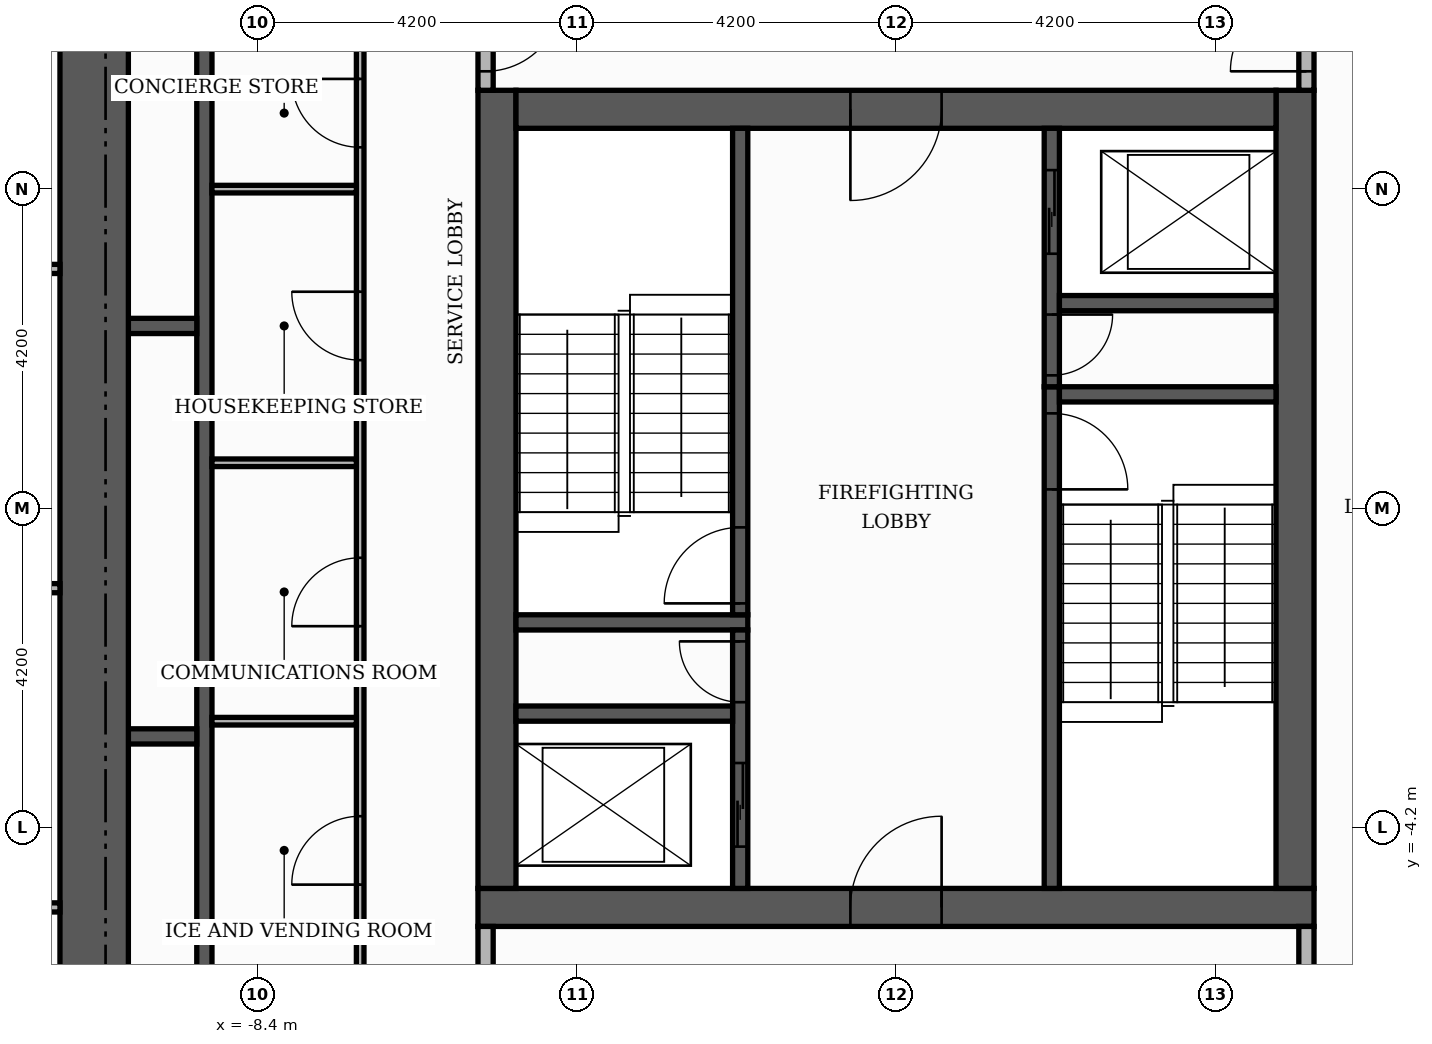
"""IFC4 building model, lengths in metres.
Left out: names, types, materials, properties, quantities, classifications, styles, units other than length and angle.
Written with IfcOpenShell. Run it as: python <this file> out.ifc"""

import sys

from ifc_helpers import new_model, si_unit, direction, frame, frame_2d, origin, place, context, subcontext, project, spatial, rectangle, extrude, element, fill, save


model = new_model("IFC4")
c1 = context("Model", 3, precision=1e-05, world=origin(), true_north=direction((0.0, 1.0)))
c2 = subcontext(c1, "Body", "Model", "MODEL_VIEW")
j1 = project(units=[si_unit("LENGTHUNIT", "METRE"), si_unit("PLANEANGLEUNIT", "RADIAN")], contexts=[c1])
p1 = place(None, origin())
s1 = spatial("IfcSite", under=j1, at=p1, CompositionType="ELEMENT")
p2 = place(p1, origin())
s2 = spatial("IfcBuilding", under=s1, at=p2, CompositionType="ELEMENT")
p3 = place(p2, frame((0.0, 0.0, 149.4)))
s3 = spatial("IfcBuildingStorey", under=s2, at=p3, CompositionType="ELEMENT", Elevation=149.4)
p4 = place(p3, frame((-5.5, -5.25, 0.0), z_axis=(0.0, 0.0, 1.0), x_axis=(1.0, 0.0, 0.0)))
e1 = element("IfcWall", 1, at=p4, inside=s3, PredefinedType="SHEAR", context=c2, shape_type="SweptSolid", body=[
    extrude(rectangle(XDim=11.0, YDim=0.5, at=frame_2d((5.5, 0.0))), origin(), (0.0, 0.0, 1.0), 3.48),
])
p5 = place(p4, frame((4.9, 0.0, 0.0)))
e2 = element("IfcOpeningElement", 2, at=p5, cuts=e1, PredefinedType="OPENING", context=c2, shape_type="SweptSolid", body=[
    extrude(rectangle(XDim=1.2, YDim=2.1, at=frame_2d((0.6, 1.05))), frame((0.0, 0.26, 0.0), z_axis=(0.0, -1.0, 0.0), x_axis=(1.0, 0.0, 0.0)), (0.0, 0.0, 1.0), 0.52),
])
for number, where, z_axis, x_axis in (
    (3, (-5.25, -5.0, 0.0), (0.0, 0.0, 1.0), (0.0, 1.0, 0.0)),
    (4, (5.25, -5.0, 0.0), (0.0, 0.0, 1.0), (0.0, 1.0, 0.0)),
):
    element("IfcWall", number, at=place(p3, frame(where, z_axis=z_axis, x_axis=x_axis)), inside=s3, PredefinedType="SHEAR", context=c2, shape_type="SweptSolid", body=[
        extrude(rectangle(XDim=10.5, YDim=0.5, at=frame_2d((5.25, 0.0))), origin(), (0.0, 0.0, 1.0), 3.48),
    ])
p6 = place(p3, frame((-5.0, 5.25, 0.0), z_axis=(0.0, 0.0, 1.0), x_axis=(1.0, 0.0, 0.0)))
e5 = element("IfcWall", 5, at=p6, inside=s3, PredefinedType="SHEAR", context=c2, shape_type="SweptSolid", body=[
    extrude(rectangle(XDim=10.0, YDim=0.5, at=frame_2d((5.0, 0.0))), origin(), (0.0, 0.0, 1.0), 3.48),
])
p7 = place(p6, frame((4.4, 0.0, 0.0)))
e6 = element("IfcOpeningElement", 6, at=p7, cuts=e5, PredefinedType="OPENING", context=c2, shape_type="SweptSolid", body=[
    extrude(rectangle(XDim=1.2, YDim=2.1, at=frame_2d((0.6, 1.05))), frame((0.0, 0.26, 0.0), z_axis=(0.0, -1.0, 0.0), x_axis=(1.0, 0.0, 0.0)), (0.0, 0.0, 1.0), 0.52),
])
p8 = place(p3, frame((2.05, -5.0, 0.0), z_axis=(0.0, 0.0, 1.0), x_axis=(0.0, 1.0, 0.0)))
e7 = element("IfcWall", 7, at=p8, inside=s3, PredefinedType="SHEAR", context=c2, shape_type="SweptSolid", body=[
    extrude(rectangle(XDim=6.6, YDim=0.2, at=frame_2d((3.3, 0.0))), origin(), (0.0, 0.0, 1.0), 3.48),
])
p9 = place(p8, frame((5.25, 0.0, 0.0)))
e8 = element("IfcOpeningElement", 8, at=p9, cuts=e7, PredefinedType="OPENING", context=c2, shape_type="SweptSolid", body=[
    extrude(rectangle(XDim=1.0, YDim=2.1, at=frame_2d((0.5, 1.05))), frame((0.0, 0.11, 0.0), z_axis=(0.0, -1.0, 0.0), x_axis=(1.0, 0.0, 0.0)), (0.0, 0.0, 1.0), 0.22),
])
p10 = place(p3, frame((-5.0, -1.5, 0.0), z_axis=(0.0, 0.0, 1.0), x_axis=(1.0, 0.0, 0.0)))
e9 = element("IfcWall", 9, at=p10, inside=s3, PredefinedType="SHEAR", context=c2, shape_type="SweptSolid", body=[
    extrude(rectangle(XDim=3.05, YDim=0.2, at=frame_2d((1.525, 0.0))), origin(), (0.0, 0.0, 1.0), 3.48),
])
p11 = place(p3, frame((-2.05, -1.4, 0.0), z_axis=(0.0, 0.0, 1.0), x_axis=(0.0, 1.0, 0.0)))
e10 = element("IfcWall", 10, at=p11, inside=s3, PredefinedType="SHEAR", context=c2, shape_type="SweptSolid", body=[
    extrude(rectangle(XDim=6.4, YDim=0.2, at=frame_2d((3.2, 0.0))), origin(), (0.0, 0.0, 1.0), 3.48),
])
p12 = place(p11, frame((0.15, 0.0, 0.0)))
e11 = element("IfcOpeningElement", 11, at=p12, cuts=e10, PredefinedType="OPENING", context=c2, shape_type="SweptSolid", body=[
    extrude(rectangle(XDim=1.0, YDim=2.1, at=frame_2d((0.5, 1.05))), frame((0.0, 0.11, 0.0), z_axis=(0.0, -1.0, 0.0), x_axis=(1.0, 0.0, 0.0)), (0.0, 0.0, 1.0), 0.22),
])
p13 = place(p3, frame((2.15, 1.5, 0.0), z_axis=(0.0, 0.0, 1.0), x_axis=(1.0, 0.0, 0.0)))
e12 = element("IfcWall", 12, at=p13, inside=s3, PredefinedType="SHEAR", context=c2, shape_type="SweptSolid", body=[
    extrude(rectangle(XDim=2.85, YDim=0.2, at=frame_2d((1.425, 0.0))), origin(), (0.0, 0.0, 1.0), 3.48),
])
p14 = place(p3, frame((-9.1, -8.2, 0.0), z_axis=(0.0, 0.0, 1.0), x_axis=(0.0, 1.0, 0.0)))
e13 = element("IfcWall", 13, at=p14, inside=s3, PredefinedType="SHEAR", context=c2, shape_type="SweptSolid", body=[
    extrude(rectangle(XDim=16.4, YDim=0.2, at=frame_2d((8.2, 0.0))), origin(), (0.0, 0.0, 1.0), 3.48),
])
p15 = place(p3, frame((-2.05, -5.0, 0.0), z_axis=(0.0, 0.0, 1.0), x_axis=(0.0, 1.0, 0.0)))
e14 = element("IfcWall", 14, at=p15, inside=s3, PredefinedType="SHEAR", context=c2, shape_type="SweptSolid", body=[
    extrude(rectangle(XDim=3.4, YDim=0.2, at=frame_2d((1.7, 0.0))), origin(), (0.0, 0.0, 1.0), 3.48),
])
p16 = place(p15, frame((0.55, 0.0, 0.0)))
e15 = element("IfcOpeningElement", 15, at=p16, cuts=e14, PredefinedType="OPENING", context=c2, shape_type="SweptSolid", body=[
    extrude(rectangle(XDim=1.1, YDim=2.1, at=frame_2d((0.55, 1.05))), frame((0.0, 0.11, 0.0), z_axis=(0.0, -1.0, 0.0), x_axis=(1.0, 0.0, 0.0)), (0.0, 0.0, 1.0), 0.22),
])
p17 = place(p15, frame((2.45, 0.0, 0.0)))
e16 = element("IfcOpeningElement", 16, at=p17, cuts=e14, PredefinedType="OPENING", context=c2, shape_type="SweptSolid", body=[
    extrude(rectangle(XDim=0.8, YDim=2.1, at=frame_2d((0.4, 1.05))), frame((0.0, 0.11, 0.0), z_axis=(0.0, -1.0, 0.0), x_axis=(1.0, 0.0, 0.0)), (0.0, 0.0, 1.0), 0.22),
])
p18 = place(p3, frame((-10.1, -3.0, 0.0), z_axis=(0.0, 0.0, 1.0), x_axis=(1.0, 0.0, 0.0)))
e17 = element("IfcWall", 17, at=p18, inside=s3, PredefinedType="SHEAR", context=c2, shape_type="SweptSolid", body=[
    extrude(rectangle(XDim=0.9, YDim=0.2, at=frame_2d((0.45, 0.0))), origin(), (0.0, 0.0, 1.0), 3.48),
])
p19 = place(p3, frame((-5.0, -2.7, 0.0), z_axis=(0.0, 0.0, 1.0), x_axis=(1.0, 0.0, 0.0)))
e18 = element("IfcWall", 18, at=p19, inside=s3, PredefinedType="SHEAR", context=c2, shape_type="SweptSolid", body=[
    extrude(rectangle(XDim=2.85, YDim=0.2, at=frame_2d((1.425, 0.0))), origin(), (0.0, 0.0, 1.0), 3.48),
])
p20 = place(p3, frame((2.05, 1.6, 0.0), z_axis=(0.0, 0.0, 1.0), x_axis=(0.0, 1.0, 0.0)))
e19 = element("IfcWall", 19, at=p20, inside=s3, PredefinedType="SHEAR", context=c2, shape_type="SweptSolid", body=[
    extrude(rectangle(XDim=3.4, YDim=0.2, at=frame_2d((1.7, 0.0))), origin(), (0.0, 0.0, 1.0), 3.48),
])
p21 = place(p20, frame((1.75, 0.0, 0.0)))
e20 = element("IfcOpeningElement", 20, at=p21, cuts=e19, PredefinedType="OPENING", context=c2, shape_type="SweptSolid", body=[
    extrude(rectangle(XDim=1.1, YDim=2.1, at=frame_2d((0.55, 1.05))), frame((0.0, 0.11, 0.0), z_axis=(0.0, -1.0, 0.0), x_axis=(1.0, 0.0, 0.0)), (0.0, 0.0, 1.0), 0.22),
])
p22 = place(p20, frame((0.15, 0.0, 0.0)))
e21 = element("IfcOpeningElement", 21, at=p22, cuts=e19, PredefinedType="OPENING", context=c2, shape_type="SweptSolid", body=[
    extrude(rectangle(XDim=0.8, YDim=2.1, at=frame_2d((0.4, 1.05))), frame((0.0, 0.11, 0.0), z_axis=(0.0, -1.0, 0.0), x_axis=(1.0, 0.0, 0.0)), (0.0, 0.0, 1.0), 0.22),
])
p23 = place(p3, frame((-10.1, 2.4, 0.0), z_axis=(0.0, 0.0, 1.0), x_axis=(1.0, 0.0, 0.0)))
e22 = element("IfcWall", 22, at=p23, inside=s3, PredefinedType="SHEAR", context=c2, shape_type="SweptSolid", body=[
    extrude(rectangle(XDim=0.9, YDim=0.2, at=frame_2d((0.45, 0.0))), origin(), (0.0, 0.0, 1.0), 3.48),
])
p24 = place(p3, frame((2.15, 2.7, 0.0), z_axis=(0.0, 0.0, 1.0), x_axis=(1.0, 0.0, 0.0)))
e23 = element("IfcWall", 23, at=p24, inside=s3, PredefinedType="SHEAR", context=c2, shape_type="SweptSolid", body=[
    extrude(rectangle(XDim=2.85, YDim=0.2, at=frame_2d((1.425, 0.0))), origin(), (0.0, 0.0, 1.0), 3.48),
])
p25 = place(p3, frame((-10.55, -10.1, 0.0), z_axis=(0.0, 0.0, 1.0), x_axis=(0.0, 1.0, 0.0)))
e24 = element("IfcWall", 24, at=p25, inside=s3, PredefinedType="SHEAR", context=c2, shape_type="SweptSolid", body=[
    extrude(rectangle(XDim=20.2, YDim=0.9, at=frame_2d((10.1, 0.0))), origin(), (0.0, 0.0, 1.0), 3.48),
])
p26 = place(p3, frame((-5.4, -10.1, 0.0), z_axis=(0.0, 0.0, 1.0), x_axis=(0.0, 1.0, 0.0)))
e25 = element("IfcWall", 25, at=p26, inside=s3, PredefinedType="PARTITIONING", context=c2, shape_type="SweptSolid", body=[
    extrude(rectangle(XDim=4.6, YDim=0.2, at=frame_2d((2.3, 0.0))), origin(), (0.0, 0.0, 1.0), 3.48),
])
p27 = place(p26, frame((2.9, 0.0, 0.0)))
e26 = element("IfcOpeningElement", 26, at=p27, cuts=e25, PredefinedType="OPENING", context=c2, shape_type="SweptSolid", body=[
    extrude(rectangle(XDim=1.0, YDim=2.1, at=frame_2d((0.5, 1.05))), frame((0.0, 0.11, 0.0), z_axis=(0.0, -1.0, 0.0), x_axis=(1.0, 0.0, 0.0)), (0.0, 0.0, 1.0), 0.22),
])
p28 = place(p3, frame((5.4, -10.1, 0.0), z_axis=(0.0, 0.0, 1.0), x_axis=(0.0, 1.0, 0.0)))
e27 = element("IfcWall", 27, at=p28, inside=s3, PredefinedType="PARTITIONING", context=c2, shape_type="SweptSolid", body=[
    extrude(rectangle(XDim=4.6, YDim=0.2, at=frame_2d((2.3, 0.0))), origin(), (0.0, 0.0, 1.0), 3.48),
])
p29 = place(p28, frame((2.9, 0.0, 0.0)))
e28 = element("IfcOpeningElement", 28, at=p29, cuts=e27, PredefinedType="OPENING", context=c2, shape_type="SweptSolid", body=[
    extrude(rectangle(XDim=1.0, YDim=2.1, at=frame_2d((0.5, 1.05))), frame((0.0, 0.11, 0.0), z_axis=(0.0, -1.0, 0.0), x_axis=(1.0, 0.0, 0.0)), (0.0, 0.0, 1.0), 0.22),
])
p30 = place(p3, frame((-7.05, -8.2, 0.0), z_axis=(0.0, 0.0, 1.0), x_axis=(0.0, 1.0, 0.0)))
e29 = element("IfcWall", 29, at=p30, inside=s3, PredefinedType="PARTITIONING", context=c2, shape_type="SweptSolid", body=[
    extrude(rectangle(XDim=16.4, YDim=0.1, at=frame_2d((8.2, 0.0))), origin(), (0.0, 0.0, 1.0), 3.48),
])
p31 = place(p30, frame((0.5, 0.0, 0.0)))
e30 = element("IfcOpeningElement", 30, at=p31, cuts=e29, PredefinedType="OPENING", context=c2, shape_type="SweptSolid", body=[
    extrude(rectangle(XDim=1.0, YDim=2.1, at=frame_2d((0.5, 1.05))), frame((0.0, 0.06, 0.0), z_axis=(0.0, -1.0, 0.0), x_axis=(1.0, 0.0, 0.0)), (0.0, 0.0, 1.0), 0.12),
])
p32 = place(p30, frame((3.25, 0.0, 0.0)))
e31 = element("IfcOpeningElement", 31, at=p32, cuts=e29, PredefinedType="OPENING", context=c2, shape_type="SweptSolid", body=[
    extrude(rectangle(XDim=0.9, YDim=2.1, at=frame_2d((0.45, 1.05))), frame((0.0, 0.06, 0.0), z_axis=(0.0, -1.0, 0.0), x_axis=(1.0, 0.0, 0.0)), (0.0, 0.0, 1.0), 0.12),
])
p33 = place(p30, frame((6.65, 0.0, 0.0)))
e32 = element("IfcOpeningElement", 32, at=p33, cuts=e29, PredefinedType="OPENING", context=c2, shape_type="SweptSolid", body=[
    extrude(rectangle(XDim=0.9, YDim=2.1, at=frame_2d((0.45, 1.05))), frame((0.0, 0.06, 0.0), z_axis=(0.0, -1.0, 0.0), x_axis=(1.0, 0.0, 0.0)), (0.0, 0.0, 1.0), 0.12),
])
p34 = place(p30, frame((10.15, 0.0, 0.0)))
e33 = element("IfcOpeningElement", 33, at=p34, cuts=e29, PredefinedType="OPENING", context=c2, shape_type="SweptSolid", body=[
    extrude(rectangle(XDim=0.9, YDim=2.1, at=frame_2d((0.45, 1.05))), frame((0.0, 0.06, 0.0), z_axis=(0.0, -1.0, 0.0), x_axis=(1.0, 0.0, 0.0)), (0.0, 0.0, 1.0), 0.12),
])
p35 = place(p30, frame((12.95, 0.0, 0.0)))
e34 = element("IfcOpeningElement", 34, at=p35, cuts=e29, PredefinedType="OPENING", context=c2, shape_type="SweptSolid", body=[
    extrude(rectangle(XDim=0.9, YDim=2.1, at=frame_2d((0.45, 1.05))), frame((0.0, 0.06, 0.0), z_axis=(0.0, -1.0, 0.0), x_axis=(1.0, 0.0, 0.0)), (0.0, 0.0, 1.0), 0.12),
])
p36 = place(p30, frame((14.95, 0.0, 0.0)))
e35 = element("IfcOpeningElement", 35, at=p36, cuts=e29, PredefinedType="OPENING", context=c2, shape_type="SweptSolid", body=[
    extrude(rectangle(XDim=0.9, YDim=2.1, at=frame_2d((0.45, 1.05))), frame((0.0, 0.06, 0.0), z_axis=(0.0, -1.0, 0.0), x_axis=(1.0, 0.0, 0.0)), (0.0, 0.0, 1.0), 0.12),
])
for number, where, z_axis, x_axis in (
    (36, (-9.0, -2.8, 0.0), (0.0, 0.0, 1.0), (1.0, 0.0, 0.0)),
    (37, (-9.0, 0.6, 0.0), (0.0, 0.0, 1.0), (1.0, 0.0, 0.0)),
    (38, (-9.0, 4.2, 0.0), (0.0, 0.0, 1.0), (1.0, 0.0, 0.0)),
):
    element("IfcWall", number, at=place(p3, frame(where, z_axis=z_axis, x_axis=x_axis)), inside=s3, PredefinedType="PARTITIONING", context=c2, shape_type="SweptSolid", body=[
        extrude(rectangle(XDim=1.9, YDim=0.1, at=frame_2d((0.95, 0.0))), origin(), (0.0, 0.0, 1.0), 3.48),
    ])
p37 = place(p3, frame((-5.4, 5.5, 0.0), z_axis=(0.0, 0.0, 1.0), x_axis=(0.0, 1.0, 0.0)))
e39 = element("IfcWall", 39, at=p37, inside=s3, PredefinedType="PARTITIONING", context=c2, shape_type="SweptSolid", body=[
    extrude(rectangle(XDim=1.55, YDim=0.2, at=frame_2d((0.775, 0.0))), origin(), (0.0, 0.0, 1.0), 3.48),
])
p38 = place(p37, frame((0.25, 0.0, 0.0)))
e40 = element("IfcOpeningElement", 40, at=p38, cuts=e39, PredefinedType="OPENING", context=c2, shape_type="SweptSolid", body=[
    extrude(rectangle(XDim=1.0, YDim=2.1, at=frame_2d((0.5, 1.05))), frame((0.0, 0.11, 0.0), z_axis=(0.0, -1.0, 0.0), x_axis=(1.0, 0.0, 0.0)), (0.0, 0.0, 1.0), 0.22),
])
p39 = place(p3, frame((5.4, 5.5, 0.0), z_axis=(0.0, 0.0, 1.0), x_axis=(0.0, 1.0, 0.0)))
e41 = element("IfcWall", 41, at=p39, inside=s3, PredefinedType="PARTITIONING", context=c2, shape_type="SweptSolid", body=[
    extrude(rectangle(XDim=4.6, YDim=0.2, at=frame_2d((2.3, 0.0))), origin(), (0.0, 0.0, 1.0), 3.48),
])
p40 = place(p39, frame((0.25, 0.0, 0.0)))
e42 = element("IfcOpeningElement", 42, at=p40, cuts=e41, PredefinedType="OPENING", context=c2, shape_type="SweptSolid", body=[
    extrude(rectangle(XDim=1.0, YDim=2.1, at=frame_2d((0.5, 1.05))), frame((0.0, 0.11, 0.0), z_axis=(0.0, -1.0, 0.0), x_axis=(1.0, 0.0, 0.0)), (0.0, 0.0, 1.0), 0.22),
])
for number, where, z_axis, x_axis in (
    (43, (-18.62, -5.25, 0.0), (0.0, 0.0, 1.0), (1.0, 0.0, 0.0)),
    (44, (-18.62, -1.05, 0.0), (0.0, 0.0, 1.0), (1.0, 0.0, 0.0)),
    (45, (-18.62, 3.15, 0.0), (0.0, 0.0, 1.0), (1.0, 0.0, 0.0)),
):
    element("IfcWall", number, at=place(p3, frame(where, z_axis=z_axis, x_axis=x_axis)), inside=s3, PredefinedType="PARTITIONING", context=c2, shape_type="SweptSolid", body=[
        extrude(rectangle(XDim=7.62, YDim=0.12, at=frame_2d((3.81, 0.0))), origin(), (0.0, 0.0, 1.0), 3.48),
    ])
p41 = place(p21, origin())
e46 = element("IfcDoor", 46, at=p41, inside=s3, OperationType="SLIDING_TO_LEFT", PredefinedType="DOOR", context=c2, shape_type="SweptSolid", body=[
    extrude(rectangle(XDim=1.1, YDim=2.1, at=frame_2d((0.55, 1.05))), frame((0.0, 0.025, 0.0), z_axis=(0.0, -1.0, 0.0), x_axis=(1.0, 0.0, 0.0)), (0.0, 0.0, 1.0), 0.05),
])
fill(e20, e46)
p42 = place(p16, origin())
e47 = element("IfcDoor", 47, at=p42, inside=s3, OperationType="SLIDING_TO_LEFT", PredefinedType="DOOR", context=c2, shape_type="SweptSolid", body=[
    extrude(rectangle(XDim=1.1, YDim=2.1, at=frame_2d((0.55, 1.05))), frame((0.0, 0.025, 0.0), z_axis=(0.0, -1.0, 0.0), x_axis=(1.0, 0.0, 0.0)), (0.0, 0.0, 1.0), 0.05),
])
fill(e15, e47)
p43 = place(p12, origin())
e48 = element("IfcDoor", 48, at=p43, inside=s3, OperationType="SINGLE_SWING_LEFT", PredefinedType="DOOR", context=c2, shape_type="SweptSolid", body=[
    extrude(rectangle(XDim=1.0, YDim=2.1, at=frame_2d((0.5, 1.05))), frame((0.0, 0.025, 0.0), z_axis=(0.0, -1.0, 0.0), x_axis=(1.0, 0.0, 0.0)), (0.0, 0.0, 1.0), 0.05),
])
fill(e11, e48)
p44 = place(p9, frame((1.0, 0.0, 0.0), z_axis=(0.0, 0.0, 1.0), x_axis=(-1.0, 0.0, 0.0)))
e49 = element("IfcDoor", 49, at=p44, inside=s3, OperationType="SINGLE_SWING_LEFT", PredefinedType="DOOR", context=c2, shape_type="SweptSolid", body=[
    extrude(rectangle(XDim=1.0, YDim=2.1, at=frame_2d((0.5, 1.05))), frame((0.0, 0.025, 0.0), z_axis=(0.0, -1.0, 0.0), x_axis=(1.0, 0.0, 0.0)), (0.0, 0.0, 1.0), 0.05),
])
fill(e8, e49)
p45 = place(p22, frame((0.8, 0.0, 0.0), z_axis=(0.0, 0.0, 1.0), x_axis=(-1.0, 0.0, 0.0)))
e50 = element("IfcDoor", 50, at=p45, inside=s3, OperationType="SINGLE_SWING_RIGHT", PredefinedType="DOOR", context=c2, shape_type="SweptSolid", body=[
    extrude(rectangle(XDim=0.8, YDim=2.1, at=frame_2d((0.4, 1.05))), frame((0.0, 0.025, 0.0), z_axis=(0.0, -1.0, 0.0), x_axis=(1.0, 0.0, 0.0)), (0.0, 0.0, 1.0), 0.05),
])
fill(e21, e50)
p46 = place(p17, origin())
e51 = element("IfcDoor", 51, at=p46, inside=s3, OperationType="SINGLE_SWING_RIGHT", PredefinedType="DOOR", context=c2, shape_type="SweptSolid", body=[
    extrude(rectangle(XDim=0.8, YDim=2.1, at=frame_2d((0.4, 1.05))), frame((0.0, 0.025, 0.0), z_axis=(0.0, -1.0, 0.0), x_axis=(1.0, 0.0, 0.0)), (0.0, 0.0, 1.0), 0.05),
])
fill(e16, e51)
p47 = place(p7, frame((1.2, 0.0, 0.0), z_axis=(0.0, 0.0, 1.0), x_axis=(-1.0, 0.0, 0.0)))
e52 = element("IfcDoor", 52, at=p47, inside=s3, OperationType="SINGLE_SWING_LEFT", PredefinedType="DOOR", context=c2, shape_type="SweptSolid", body=[
    extrude(rectangle(XDim=1.2, YDim=2.1, at=frame_2d((0.6, 1.05))), frame((0.0, 0.025, 0.0), z_axis=(0.0, -1.0, 0.0), x_axis=(1.0, 0.0, 0.0)), (0.0, 0.0, 1.0), 0.05),
])
fill(e6, e52)
p48 = place(p5, origin())
e53 = element("IfcDoor", 53, at=p48, inside=s3, OperationType="SINGLE_SWING_RIGHT", PredefinedType="DOOR", context=c2, shape_type="SweptSolid", body=[
    extrude(rectangle(XDim=1.2, YDim=2.1, at=frame_2d((0.6, 1.05))), frame((0.0, 0.025, 0.0), z_axis=(0.0, -1.0, 0.0), x_axis=(1.0, 0.0, 0.0)), (0.0, 0.0, 1.0), 0.05),
])
fill(e2, e53)
p49 = place(p38, frame((1.0, 0.0, 0.0), z_axis=(0.0, 0.0, 1.0), x_axis=(-1.0, 0.0, 0.0)))
e54 = element("IfcDoor", 54, at=p49, inside=s3, OperationType="SINGLE_SWING_RIGHT", PredefinedType="DOOR", context=c2, shape_type="SweptSolid", body=[
    extrude(rectangle(XDim=1.0, YDim=2.1, at=frame_2d((0.5, 1.05))), frame((0.0, 0.025, 0.0), z_axis=(0.0, -1.0, 0.0), x_axis=(1.0, 0.0, 0.0)), (0.0, 0.0, 1.0), 0.05),
])
fill(e40, e54)
p50 = place(p40, origin())
e55 = element("IfcDoor", 55, at=p50, inside=s3, OperationType="SINGLE_SWING_LEFT", PredefinedType="DOOR", context=c2, shape_type="SweptSolid", body=[
    extrude(rectangle(XDim=1.0, YDim=2.1, at=frame_2d((0.5, 1.05))), frame((0.0, 0.025, 0.0), z_axis=(0.0, -1.0, 0.0), x_axis=(1.0, 0.0, 0.0)), (0.0, 0.0, 1.0), 0.05),
])
fill(e42, e55)
p51 = place(p32, origin())
e56 = element("IfcDoor", 56, at=p51, inside=s3, OperationType="SINGLE_SWING_LEFT", PredefinedType="DOOR", context=c2, shape_type="SweptSolid", body=[
    extrude(rectangle(XDim=0.9, YDim=2.1, at=frame_2d((0.45, 1.05))), frame((0.0, 0.025, 0.0), z_axis=(0.0, -1.0, 0.0), x_axis=(1.0, 0.0, 0.0)), (0.0, 0.0, 1.0), 0.05),
])
fill(e31, e56)
p52 = place(p33, origin())
e57 = element("IfcDoor", 57, at=p52, inside=s3, OperationType="SINGLE_SWING_LEFT", PredefinedType="DOOR", context=c2, shape_type="SweptSolid", body=[
    extrude(rectangle(XDim=0.9, YDim=2.1, at=frame_2d((0.45, 1.05))), frame((0.0, 0.025, 0.0), z_axis=(0.0, -1.0, 0.0), x_axis=(1.0, 0.0, 0.0)), (0.0, 0.0, 1.0), 0.05),
])
fill(e32, e57)
p53 = place(p34, origin())
e58 = element("IfcDoor", 58, at=p53, inside=s3, OperationType="SINGLE_SWING_RIGHT", PredefinedType="DOOR", context=c2, shape_type="SweptSolid", body=[
    extrude(rectangle(XDim=0.9, YDim=2.1, at=frame_2d((0.45, 1.05))), frame((0.0, 0.025, 0.0), z_axis=(0.0, -1.0, 0.0), x_axis=(1.0, 0.0, 0.0)), (0.0, 0.0, 1.0), 0.05),
])
fill(e33, e58)
p54 = place(p35, origin())
e59 = element("IfcDoor", 59, at=p54, inside=s3, OperationType="SINGLE_SWING_RIGHT", PredefinedType="DOOR", context=c2, shape_type="SweptSolid", body=[
    extrude(rectangle(XDim=0.9, YDim=2.1, at=frame_2d((0.45, 1.05))), frame((0.0, 0.025, 0.0), z_axis=(0.0, -1.0, 0.0), x_axis=(1.0, 0.0, 0.0)), (0.0, 0.0, 1.0), 0.05),
])
fill(e34, e59)
save(model, sys.argv[1])
